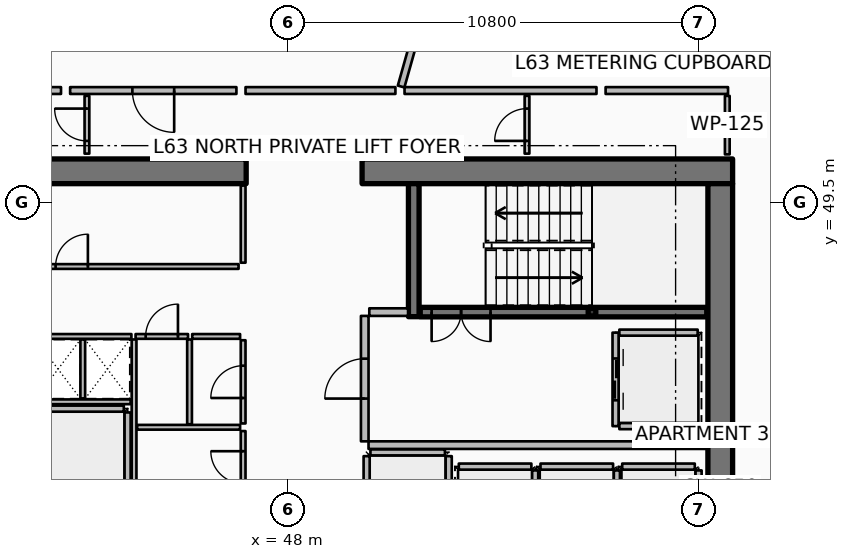
"""IFC4 building model, lengths in metres.
Left out: names, types, materials, properties, quantities, classifications, styles, units other than length and angle.
Written with IfcOpenShell. Run it as: python <this file> out.ifc"""

import sys

from ifc_helpers import new_model, si_unit, direction, frame, frame_2d, origin, origin_2d, place, context, subcontext, project, spatial, rectangle, hollow_rectangle, extrude, element, fill, save


model = new_model("IFC4")
c1 = context("Model", 3, precision=1e-05, world=origin(), true_north=direction((0.0, 1.0)))
c2 = subcontext(c1, "Body", "Model", "MODEL_VIEW")
j1 = project(units=[si_unit("LENGTHUNIT", "METRE"), si_unit("PLANEANGLEUNIT", "RADIAN")], contexts=[c1])
p1 = place(None, origin())
s1 = spatial("IfcSite", under=j1, at=p1, CompositionType="ELEMENT")
p2 = place(p1, origin())
s2 = spatial("IfcBuilding", under=s1, at=p2, CompositionType="ELEMENT")
p3 = place(p2, frame((0.0, 0.0, 252.1)))
s3 = spatial("IfcBuildingStorey", under=s2, at=p3, CompositionType="ELEMENT", Elevation=252.1)
for number, where, z_axis, x_axis in (
    (1, (37.15, 50.325, 0.0), (0.0, 0.0, 1.0), (1.0, 0.0, 0.0)),
    (2, (49.95, 50.325, 0.0), (0.0, 0.0, 1.0), (1.0, 0.0, 0.0)),
):
    element("IfcWall", number, at=place(p3, frame(where, z_axis=z_axis, x_axis=x_axis)), inside=s3, PredefinedType="SHEAR", context=c2, shape_type="SweptSolid", body=[
        extrude(rectangle(XDim=9.75, YDim=0.65, at=frame_2d((4.875, 0.0))), origin(), (0.0, 0.0, 1.0), 3.85),
    ])
p4 = place(p3, frame((59.375, 34.0, 0.0), z_axis=(0.0, 0.0, 1.0), x_axis=(0.0, 1.0, 0.0)))
e3 = element("IfcWall", 3, at=p4, inside=s3, PredefinedType="SHEAR", context=c2, shape_type="SweptSolid", body=[
    extrude(rectangle(XDim=16.0, YDim=0.65, at=frame_2d((8.0, 0.0))), origin(), (0.0, 0.0, 1.0), 3.85),
])
p5 = place(p3, frame((51.31, 46.5, 0.0), z_axis=(0.0, 0.0, 1.0), x_axis=(0.0, 1.0, 0.0)))
e4 = element("IfcWall", 4, at=p5, inside=s3, PredefinedType="SHEAR", context=c2, shape_type="SweptSolid", body=[
    extrude(rectangle(XDim=3.5, YDim=0.28, at=frame_2d((1.75, 0.0))), origin(), (0.0, 0.0, 1.0), 3.85),
])
p6 = place(p3, frame((56.0, 46.62, 0.0), z_axis=(0.0, 0.0, 1.0), x_axis=(1.0, 0.0, 0.0)))
e5 = element("IfcColumn", 5, at=p6, inside=s3, PredefinedType="COLUMN", context=c2, shape_type="SweptSolid", body=[
    extrude(hollow_rectangle(XDim=0.2, YDim=0.2, WallThickness=0.01, InnerFilletRadius=0.01, OuterFilletRadius=0.02, at=origin_2d()), origin(), (0.0, 0.0, 1.0), 1.72),
])
p7 = place(p3, frame((51.48, 46.62, 0.0), z_axis=(0.0, 0.0, 1.0), x_axis=(1.0, 0.0, 0.0)))
e6 = element("IfcWall", 6, at=p7, inside=s3, PredefinedType="SOLIDWALL", context=c2, shape_type="SweptSolid", body=[
    extrude(rectangle(XDim=7.54, YDim=0.25, at=frame_2d((3.77, 0.0))), origin(), (0.0, 0.0, 1.0), 3.59),
])
p8 = place(p7, frame((0.3, 0.0, 0.0)))
e7 = element("IfcOpeningElement", 7, at=p8, cuts=e6, PredefinedType="OPENING", context=c2, shape_type="SweptSolid", body=[
    extrude(rectangle(XDim=1.55, YDim=2.15, at=frame_2d((0.775, 1.075))), frame((0.0, 0.135, 0.0), z_axis=(0.0, -1.0, 0.0), x_axis=(1.0, 0.0, 0.0)), (0.0, 0.0, 1.0), 0.27),
])
p9 = place(p3, frame((54.505, 40.845, 0.0), z_axis=(0.0, 0.0, 1.0), x_axis=(0.0, 1.0, 0.0)))
e8 = element("IfcWall", 8, at=p9, inside=s3, PredefinedType="PARTITIONING", context=c2, shape_type="SweptSolid", body=[
    extrude(rectangle(XDim=1.61, YDim=0.16, at=frame_2d((0.805, 0.0))), origin(), (0.0, 0.0, 1.0), 3.59),
])
p10 = place(p3, frame((52.495, 42.555, 0.0), z_axis=(0.0, 0.0, 1.0), x_axis=(1.0, 0.0, 0.0)))
e9 = element("IfcWall", 9, at=p10, inside=s3, PredefinedType="PARTITIONING", context=c2, shape_type="SweptSolid", body=[
    extrude(rectangle(XDim=1.91, YDim=0.16, at=frame_2d((0.955, 0.0))), origin(), (0.0, 0.0, 1.0), 3.59),
])
p11 = place(p3, frame((56.655, 40.845, 0.0), z_axis=(0.0, 0.0, 1.0), x_axis=(0.0, 1.0, 0.0)))
e10 = element("IfcWall", 10, at=p11, inside=s3, PredefinedType="PARTITIONING", context=c2, shape_type="SweptSolid", body=[
    extrude(rectangle(XDim=1.61, YDim=0.16, at=frame_2d((0.805, 0.0))), origin(), (0.0, 0.0, 1.0), 3.59),
])
p12 = place(p3, frame((54.645, 42.555, 0.0), z_axis=(0.0, 0.0, 1.0), x_axis=(1.0, 0.0, 0.0)))
e11 = element("IfcWall", 11, at=p12, inside=s3, PredefinedType="PARTITIONING", context=c2, shape_type="SweptSolid", body=[
    extrude(rectangle(XDim=1.91, YDim=0.16, at=frame_2d((0.955, 0.0))), origin(), (0.0, 0.0, 1.0), 3.59),
])
p13 = place(p3, frame((58.805, 40.845, 0.0), z_axis=(0.0, 0.0, 1.0), x_axis=(0.0, 1.0, 0.0)))
e12 = element("IfcWall", 12, at=p13, inside=s3, PredefinedType="PARTITIONING", context=c2, shape_type="SweptSolid", body=[
    extrude(rectangle(XDim=1.61, YDim=0.16, at=frame_2d((0.805, 0.0))), origin(), (0.0, 0.0, 1.0), 3.59),
])
p14 = place(p3, frame((56.795, 42.555, 0.0), z_axis=(0.0, 0.0, 1.0), x_axis=(1.0, 0.0, 0.0)))
e13 = element("IfcWall", 13, at=p14, inside=s3, PredefinedType="PARTITIONING", context=c2, shape_type="SweptSolid", body=[
    extrude(rectangle(XDim=1.91, YDim=0.16, at=frame_2d((0.955, 0.0))), origin(), (0.0, 0.0, 1.0), 3.59),
])
p15 = place(p3, frame((43.78, 41.72, 0.0), z_axis=(0.0, 0.0, 1.0), x_axis=(0.0, 1.0, 0.0)))
e14 = element("IfcWall", 14, at=p15, inside=s3, PredefinedType="PARTITIONING", context=c2, shape_type="SweptSolid", body=[
    extrude(rectangle(XDim=2.26, YDim=0.16, at=frame_2d((1.13, 0.0))), origin(), (0.0, 0.0, 1.0), 3.59),
])
p16 = place(p3, frame((41.62, 44.08, 0.0), z_axis=(0.0, 0.0, 1.0), x_axis=(1.0, 0.0, 0.0)))
e15 = element("IfcWall", 15, at=p16, inside=s3, PredefinedType="PARTITIONING", context=c2, shape_type="SweptSolid", body=[
    extrude(rectangle(XDim=2.06, YDim=0.16, at=frame_2d((1.03, 0.0))), origin(), (0.0, 0.0, 1.0), 3.59),
])
p17 = place(p3, frame((56.62, 46.08, 0.0), z_axis=(0.0, 0.0, 1.0), x_axis=(0.0, -1.0, 0.0)))
e16 = element("IfcWall", 16, at=p17, inside=s3, PredefinedType="PARTITIONING", context=c2, shape_type="SweptSolid", body=[
    extrude(rectangle(XDim=2.46, YDim=0.16, at=frame_2d((1.23, 0.0))), origin(), (0.0, 0.0, 1.0), 3.59),
])
p18 = place(p17, frame((0.68, 0.0, 0.0)))
e17 = element("IfcOpeningElement", 17, at=p18, cuts=e16, PredefinedType="OPENING", context=c2, shape_type="SweptSolid", body=[
    extrude(rectangle(XDim=1.1, YDim=2.1, at=frame_2d((0.55, 1.05))), frame((0.0, 0.09, 0.0), z_axis=(0.0, -1.0, 0.0), x_axis=(1.0, 0.0, 0.0)), (0.0, 0.0, 1.0), 0.18),
])
for number, where, z_axis, x_axis in (
    (18, (56.72, 46.08, 0.0), (0.0, 0.0, 1.0), (1.0, 0.0, 0.0)),
    (19, (56.72, 43.62, 0.0), (0.0, 0.0, 1.0), (1.0, 0.0, 0.0)),
):
    element("IfcWall", number, at=place(p3, frame(where, z_axis=z_axis, x_axis=x_axis)), inside=s3, PredefinedType="PARTITIONING", context=c2, shape_type="SweptSolid", body=[
        extrude(rectangle(XDim=2.06, YDim=0.16, at=frame_2d((1.03, 0.0))), origin(), (0.0, 0.0, 1.0), 3.59),
    ])
for number, where, z_axis, x_axis in (
    (20, (52.23, 40.67, 0.0), (0.0, 0.0, 1.0), (0.0, 1.0, 0.0)),
    (21, (50.07, 40.67, 0.0), (0.0, 0.0, 1.0), (0.0, 1.0, 0.0)),
):
    element("IfcWall", number, at=place(p3, frame(where, z_axis=z_axis, x_axis=x_axis)), inside=s3, PredefinedType="PARTITIONING", context=c2, shape_type="SweptSolid", body=[
        extrude(rectangle(XDim=2.16, YDim=0.16, at=frame_2d((1.08, 0.0))), origin(), (0.0, 0.0, 1.0), 3.59),
    ])
p19 = place(p3, frame((50.17, 42.93, 0.0), z_axis=(0.0, 0.0, 1.0), x_axis=(1.0, 0.0, 0.0)))
e22 = element("IfcWall", 22, at=p19, inside=s3, PredefinedType="PARTITIONING", context=c2, shape_type="SweptSolid", body=[
    extrude(rectangle(XDim=1.96, YDim=0.16, at=frame_2d((0.98, 0.0))), origin(), (0.0, 0.0, 1.0), 3.59),
])
p20 = place(p3, frame((46.82, 47.92, 0.0), z_axis=(0.0, 0.0, 1.0), x_axis=(0.0, 1.0, 0.0)))
e23 = element("IfcWall", 23, at=p20, inside=s3, PredefinedType="PARTITIONING", context=c2, shape_type="SweptSolid", body=[
    extrude(rectangle(XDim=2.03, YDim=0.125, at=frame_2d((1.015, 0.0))), origin(), (0.0, 0.0, 1.0), 3.03),
])
p21 = place(p3, frame((37.92, 47.82, 0.0), z_axis=(0.0, 0.0, 1.0), x_axis=(1.0, 0.0, 0.0)))
e24 = element("IfcWall", 24, at=p21, inside=s3, PredefinedType="PARTITIONING", context=c2, shape_type="SweptSolid", body=[
    extrude(rectangle(XDim=8.78, YDim=0.125, at=frame_2d((4.39, 0.0))), origin(), (0.0, 0.0, 1.0), 3.03),
])
p22 = place(p21, frame((3.965, 0.0, 0.0)))
e25 = element("IfcOpeningElement", 25, at=p22, cuts=e24, PredefinedType="OPENING", context=c2, shape_type="SweptSolid", body=[
    extrude(rectangle(XDim=0.85, YDim=2.06, at=frame_2d((0.425, 1.03))), frame((0.0, 0.073, 0.0), z_axis=(0.0, -1.0, 0.0), x_axis=(1.0, 0.0, 0.0)), (0.0, 0.0, 1.0), 0.145),
])
p23 = place(p3, frame((50.12, 43.12, 0.0), z_axis=(0.0, 0.0, 1.0), x_axis=(1.0, 0.0, 0.0)))
e26 = element("IfcWall", 26, at=p23, inside=s3, PredefinedType="PARTITIONING", context=c2, shape_type="SweptSolid", body=[
    extrude(rectangle(XDim=8.88, YDim=0.2, at=frame_2d((4.44, 0.0))), origin(), (0.0, 0.0, 1.0), 3.59),
])
p24 = place(p3, frame((50.14, 46.62, 0.0), z_axis=(0.0, 0.0, 1.0), x_axis=(1.0, 0.0, 0.0)))
e27 = element("IfcWall", 27, at=p24, inside=s3, PredefinedType="PARTITIONING", context=c2, shape_type="SweptSolid", body=[
    extrude(rectangle(XDim=1.02, YDim=0.2, at=frame_2d((0.51, 0.0))), origin(), (0.0, 0.0, 1.0), 3.59),
])
p25 = place(p3, frame((50.02, 43.22, 0.0), z_axis=(0.0, 0.0, 1.0), x_axis=(0.0, 1.0, 0.0)))
e28 = element("IfcWall", 28, at=p25, inside=s3, PredefinedType="PARTITIONING", context=c2, shape_type="SweptSolid", body=[
    extrude(rectangle(XDim=3.3, YDim=0.2, at=frame_2d((1.65, 0.0))), origin(), (0.0, 0.0, 1.0), 3.59),
])
p26 = place(p25, frame((1.125, 0.0, 0.0)))
e29 = element("IfcOpeningElement", 29, at=p26, cuts=e28, PredefinedType="OPENING", context=c2, shape_type="SweptSolid", body=[
    extrude(rectangle(XDim=1.05, YDim=2.1, at=frame_2d((0.525, 1.05))), frame((0.0, 0.11, 0.0), z_axis=(0.0, -1.0, 0.0), x_axis=(1.0, 0.0, 0.0)), (0.0, 0.0, 1.0), 0.22),
])
p27 = place(p3, frame((41.36, 44.26, 0.0), z_axis=(0.0, 0.0, 1.0), x_axis=(1.0, 0.0, 0.0)))
e30 = element("IfcWall", 30, at=p27, inside=s3, PredefinedType="PARTITIONING", context=c2, shape_type="SweptSolid", body=[
    extrude(rectangle(XDim=2.5, YDim=0.125, at=frame_2d((1.25, 0.0))), origin(), (0.0, 0.0, 1.0), 3.03),
])
p28 = place(p3, frame((42.6, 44.35, 0.0), z_axis=(0.0, 0.0, 1.0), x_axis=(0.0, 1.0, 0.0)))
e31 = element("IfcWall", 31, at=p28, inside=s3, PredefinedType="PARTITIONING", context=c2, shape_type="SweptSolid", body=[
    extrude(rectangle(XDim=1.55, YDim=0.125, at=frame_2d((0.775, 0.0))), origin(), (0.0, 0.0, 1.0), 3.03),
])
p29 = place(p3, frame((43.95, 41.58, 0.0), z_axis=(0.0, 0.0, 1.0), x_axis=(0.0, 1.0, 0.0)))
e32 = element("IfcWall", 32, at=p29, inside=s3, PredefinedType="PARTITIONING", context=c2, shape_type="SweptSolid", body=[
    extrude(rectangle(XDim=4.32, YDim=0.125, at=frame_2d((2.16, 0.0))), origin(), (0.0, 0.0, 1.0), 3.03),
])
p30 = place(p3, frame((44.03, 43.59, 0.0), z_axis=(0.0, 0.0, 1.0), x_axis=(1.0, 0.0, 0.0)))
e33 = element("IfcWall", 33, at=p30, inside=s3, PredefinedType="PARTITIONING", context=c2, shape_type="SweptSolid", body=[
    extrude(rectangle(XDim=2.71, YDim=0.125, at=frame_2d((1.355, 0.0))), origin(), (0.0, 0.0, 1.0), 3.03),
])
p31 = place(p3, frame((45.41, 43.67, 0.0), z_axis=(0.0, 0.0, 1.0), x_axis=(0.0, 1.0, 0.0)))
e34 = element("IfcWall", 34, at=p31, inside=s3, PredefinedType="PARTITIONING", context=c2, shape_type="SweptSolid", body=[
    extrude(rectangle(XDim=2.23, YDim=0.125, at=frame_2d((1.115, 0.0))), origin(), (0.0, 0.0, 1.0), 3.03),
])
p32 = place(p3, frame((46.82, 41.58, 0.0), z_axis=(0.0, 0.0, 1.0), x_axis=(0.0, 1.0, 0.0)))
e35 = element("IfcWall", 35, at=p32, inside=s3, PredefinedType="PARTITIONING", context=c2, shape_type="SweptSolid", body=[
    extrude(rectangle(XDim=1.91, YDim=0.125, at=frame_2d((0.955, 0.0))), origin(), (0.0, 0.0, 1.0), 3.03),
])
p33 = place(p32, frame((0.53, 0.0, 0.0)))
e36 = element("IfcOpeningElement", 36, at=p33, cuts=e35, PredefinedType="OPENING", context=c2, shape_type="SweptSolid", body=[
    extrude(rectangle(XDim=0.85, YDim=2.06, at=frame_2d((0.425, 1.03))), frame((0.0, 0.073, 0.0), z_axis=(0.0, -1.0, 0.0), x_axis=(1.0, 0.0, 0.0)), (0.0, 0.0, 1.0), 0.145),
])
p34 = place(p3, frame((46.82, 43.69, 0.0), z_axis=(0.0, 0.0, 1.0), x_axis=(0.0, 1.0, 0.0)))
e37 = element("IfcWall", 37, at=p34, inside=s3, PredefinedType="PARTITIONING", context=c2, shape_type="SweptSolid", body=[
    extrude(rectangle(XDim=2.19, YDim=0.125, at=frame_2d((1.095, 0.0))), origin(), (0.0, 0.0, 1.0), 3.03),
])
p35 = place(p34, frame((0.67, 0.0, 0.0)))
e38 = element("IfcOpeningElement", 38, at=p35, cuts=e37, PredefinedType="OPENING", context=c2, shape_type="SweptSolid", body=[
    extrude(rectangle(XDim=0.85, YDim=2.06, at=frame_2d((0.425, 1.03))), frame((0.0, 0.073, 0.0), z_axis=(0.0, -1.0, 0.0), x_axis=(1.0, 0.0, 0.0)), (0.0, 0.0, 1.0), 0.145),
])
p36 = place(p3, frame((41.35, 45.98, 0.0), z_axis=(0.0, 0.0, 1.0), x_axis=(1.0, 0.0, 0.0)))
e39 = element("IfcWall", 39, at=p36, inside=s3, PredefinedType="PARTITIONING", context=c2, shape_type="SweptSolid", body=[
    extrude(rectangle(XDim=2.53, YDim=0.125, at=frame_2d((1.265, 0.0))), origin(), (0.0, 0.0, 1.0), 3.03),
])
p37 = place(p3, frame((43.99, 45.98, 0.0), z_axis=(0.0, 0.0, 1.0), x_axis=(1.0, 0.0, 0.0)))
e40 = element("IfcWall", 40, at=p37, inside=s3, PredefinedType="PARTITIONING", context=c2, shape_type="SweptSolid", body=[
    extrude(rectangle(XDim=1.38, YDim=0.125, at=frame_2d((0.69, 0.0))), origin(), (0.0, 0.0, 1.0), 3.03),
])
p38 = place(p37, frame((0.265, 0.0, 0.0)))
e41 = element("IfcOpeningElement", 41, at=p38, cuts=e40, PredefinedType="OPENING", context=c2, shape_type="SweptSolid", body=[
    extrude(rectangle(XDim=0.85, YDim=2.06, at=frame_2d((0.425, 1.03))), frame((0.0, 0.073, 0.0), z_axis=(0.0, -1.0, 0.0), x_axis=(1.0, 0.0, 0.0)), (0.0, 0.0, 1.0), 0.145),
])
p39 = place(p3, frame((45.48, 45.98, 0.0), z_axis=(0.0, 0.0, 1.0), x_axis=(1.0, 0.0, 0.0)))
e42 = element("IfcWall", 42, at=p39, inside=s3, PredefinedType="PARTITIONING", context=c2, shape_type="SweptSolid", body=[
    extrude(rectangle(XDim=1.26, YDim=0.125, at=frame_2d((0.63, 0.0))), origin(), (0.0, 0.0, 1.0), 3.03),
])
p40 = place(p3, frame((59.56, 50.77, 0.0), z_axis=(0.0, 0.0, 1.0), x_axis=(0.0, 1.0, 0.0)))
e43 = element("IfcWall", 43, at=p40, inside=s3, PredefinedType="PARTITIONING", context=c2, shape_type="SweptSolid", body=[
    extrude(rectangle(XDim=1.54, YDim=0.125, at=frame_2d((0.77, 0.0))), origin(), (0.0, 0.0, 1.0), 3.03),
])
p41 = place(p3, frame((42.71, 50.79, 0.0), z_axis=(0.0, 0.0, 1.0), x_axis=(0.0, 1.0, 0.0)))
e44 = element("IfcWall", 44, at=p41, inside=s3, PredefinedType="PARTITIONING", context=c2, shape_type="SweptSolid", body=[
    extrude(rectangle(XDim=1.52, YDim=0.125, at=frame_2d((0.76, 0.0))), origin(), (0.0, 0.0, 1.0), 2.957),
])
p42 = place(p41, frame((0.335, 0.0, 0.0)))
e45 = element("IfcOpeningElement", 45, at=p42, cuts=e44, PredefinedType="OPENING", context=c2, shape_type="SweptSolid", body=[
    extrude(rectangle(XDim=0.85, YDim=2.06, at=frame_2d((0.425, 1.03))), frame((0.0, 0.073, 0.0), z_axis=(0.0, -1.0, 0.0), x_axis=(1.0, 0.0, 0.0)), (0.0, 0.0, 1.0), 0.145),
])
p43 = place(p3, frame((54.29, 50.79, 0.0), z_axis=(0.0, 0.0, 1.0), x_axis=(0.0, 1.0, 0.0)))
e46 = element("IfcWall", 46, at=p43, inside=s3, PredefinedType="PARTITIONING", context=c2, shape_type="SweptSolid", body=[
    extrude(rectangle(XDim=1.52, YDim=0.125, at=frame_2d((0.76, 0.0))), origin(), (0.0, 0.0, 1.0), 3.03),
])
p44 = place(p43, frame((0.335, 0.0, 0.0)))
e47 = element("IfcOpeningElement", 47, at=p44, cuts=e46, PredefinedType="OPENING", context=c2, shape_type="SweptSolid", body=[
    extrude(rectangle(XDim=0.85, YDim=2.06, at=frame_2d((0.425, 1.03))), frame((0.0, 0.073, 0.0), z_axis=(0.0, -1.0, 0.0), x_axis=(1.0, 0.0, 0.0)), (0.0, 0.0, 1.0), 0.145),
])
p45 = place(p3, frame((50.977, 52.556, 0.0), z_axis=(0.0, 0.0, 1.0), x_axis=(0.271442063103, 0.962454781472, 0.0)))
e48 = element("IfcWall", 48, at=p45, inside=s3, PredefinedType="PARTITIONING", context=c2, shape_type="SweptSolid", body=[
    extrude(rectangle(XDim=16.017, YDim=0.18, at=frame_2d((8.008, 0.0))), origin(), (0.0, 0.0, 1.0), 2.957),
])
p46 = place(p3, frame((46.643, 52.45, 0.0), z_axis=(0.0, 0.0, 1.0), x_axis=(-1.0, 0.0, 0.0)))
e49 = element("IfcWall", 49, at=p46, inside=s3, PredefinedType="PARTITIONING", context=c2, shape_type="SweptSolid", body=[
    extrude(rectangle(XDim=4.376, YDim=0.18, at=frame_2d((2.188, 0.0))), origin(), (0.0, 0.0, 1.0), 2.957),
])
p47 = place(p46, frame((1.638, 0.0, 0.0)))
e50 = element("IfcOpeningElement", 50, at=p47, cuts=e49, PredefinedType="OPENING", context=c2, shape_type="SweptSolid", body=[
    extrude(rectangle(XDim=1.1, YDim=2.1, at=frame_2d((0.55, 1.05))), frame((0.0, 0.1, 0.0), z_axis=(0.0, -1.0, 0.0), x_axis=(1.0, 0.0, 0.0)), (0.0, 0.0, 1.0), 0.2),
])
p48 = place(p3, frame((50.827, 52.45, 0.0), z_axis=(0.0, 0.0, 1.0), x_axis=(-1.0, 0.0, 0.0)))
e51 = element("IfcWall", 51, at=p48, inside=s3, PredefinedType="PARTITIONING", context=c2, shape_type="SweptSolid", body=[
    extrude(rectangle(XDim=3.944, YDim=0.18, at=frame_2d((1.972, 0.0))), origin(), (0.0, 0.0, 1.0), 2.957),
])
p49 = place(p3, frame((42.028, 52.45, 0.0), z_axis=(0.0, 0.0, 1.0), x_axis=(-1.0, 0.0, 0.0)))
e52 = element("IfcWall", 52, at=p49, inside=s3, PredefinedType="PARTITIONING", context=c2, shape_type="SweptSolid", body=[
    extrude(rectangle(XDim=4.758, YDim=0.18, at=frame_2d((2.379, 0.0))), origin(), (0.0, 0.0, 1.0), 2.957),
])
p50 = place(p3, frame((59.58, 52.45, 0.0), z_axis=(0.0, 0.0, 1.0), x_axis=(-1.0, 0.0, 0.0)))
e53 = element("IfcWall", 53, at=p50, inside=s3, PredefinedType="PARTITIONING", context=c2, shape_type="SweptSolid", body=[
    extrude(rectangle(XDim=3.222, YDim=0.18, at=frame_2d((1.611, 0.0))), origin(), (0.0, 0.0, 1.0), 2.957),
])
p51 = place(p3, frame((56.118, 52.45, 0.0), z_axis=(0.0, 0.0, 1.0), x_axis=(-1.0, 0.0, 0.0)))
e54 = element("IfcWall", 54, at=p51, inside=s3, PredefinedType="PARTITIONING", context=c2, shape_type="SweptSolid", body=[
    extrude(rectangle(XDim=5.051, YDim=0.18, at=frame_2d((2.525, 0.0))), origin(), (0.0, 0.0, 1.0), 2.957),
])
p52 = place(p8, origin())
e55 = element("IfcDoor", 55, at=p52, inside=s3, OperationType="DOUBLE_DOOR_SINGLE_SWING", PredefinedType="DOOR", context=c2, shape_type="SweptSolid", body=[
    extrude(rectangle(XDim=1.55, YDim=2.15, at=frame_2d((0.775, 1.075))), frame((0.0, 0.025, 0.0), z_axis=(0.0, -1.0, 0.0), x_axis=(1.0, 0.0, 0.0)), (0.0, 0.0, 1.0), 0.05),
])
fill(e7, e55)
p53 = place(p18, origin())
e56 = element("IfcDoor", 56, at=p53, inside=s3, OperationType="DOUBLE_DOOR_SLIDING", PredefinedType="DOOR", context=c2, shape_type="SweptSolid", body=[
    extrude(rectangle(XDim=1.1, YDim=2.1, at=frame_2d((0.55, 1.05))), frame((0.0, 0.025, 0.0), z_axis=(0.0, -1.0, 0.0), x_axis=(1.0, 0.0, 0.0)), (0.0, 0.0, 1.0), 0.05),
])
fill(e17, e56)
p54 = place(p22, origin())
e57 = element("IfcDoor", 57, at=p54, inside=s3, OperationType="SINGLE_SWING_RIGHT", PredefinedType="DOOR", context=c2, shape_type="SweptSolid", body=[
    extrude(rectangle(XDim=0.85, YDim=2.06, at=frame_2d((0.425, 1.03))), frame((0.0, 0.025, 0.0), z_axis=(0.0, -1.0, 0.0), x_axis=(1.0, 0.0, 0.0)), (0.0, 0.0, 1.0), 0.05),
])
fill(e25, e57)
p55 = place(p26, origin())
e58 = element("IfcDoor", 58, at=p55, inside=s3, OperationType="SINGLE_SWING_LEFT", PredefinedType="DOOR", context=c2, shape_type="SweptSolid", body=[
    extrude(rectangle(XDim=1.05, YDim=2.1, at=frame_2d((0.525, 1.05))), frame((0.0, 0.025, 0.0), z_axis=(0.0, -1.0, 0.0), x_axis=(1.0, 0.0, 0.0)), (0.0, 0.0, 1.0), 0.05),
])
fill(e29, e58)
p56 = place(p33, origin())
e59 = element("IfcDoor", 59, at=p56, inside=s3, OperationType="SINGLE_SWING_RIGHT", PredefinedType="DOOR", context=c2, shape_type="SweptSolid", body=[
    extrude(rectangle(XDim=0.85, YDim=2.06, at=frame_2d((0.425, 1.03))), frame((0.0, 0.025, 0.0), z_axis=(0.0, -1.0, 0.0), x_axis=(1.0, 0.0, 0.0)), (0.0, 0.0, 1.0), 0.05),
])
fill(e36, e59)
p57 = place(p35, origin())
e60 = element("IfcDoor", 60, at=p57, inside=s3, OperationType="SINGLE_SWING_LEFT", PredefinedType="DOOR", context=c2, shape_type="SweptSolid", body=[
    extrude(rectangle(XDim=0.85, YDim=2.06, at=frame_2d((0.425, 1.03))), frame((0.0, 0.025, 0.0), z_axis=(0.0, -1.0, 0.0), x_axis=(1.0, 0.0, 0.0)), (0.0, 0.0, 1.0), 0.05),
])
fill(e38, e60)
p58 = place(p38, origin())
e61 = element("IfcDoor", 61, at=p58, inside=s3, OperationType="SINGLE_SWING_RIGHT", PredefinedType="DOOR", context=c2, shape_type="SweptSolid", body=[
    extrude(rectangle(XDim=0.85, YDim=2.06, at=frame_2d((0.425, 1.03))), frame((0.0, 0.025, 0.0), z_axis=(0.0, -1.0, 0.0), x_axis=(1.0, 0.0, 0.0)), (0.0, 0.0, 1.0), 0.05),
])
fill(e41, e61)
p59 = place(p42, origin())
e62 = element("IfcDoor", 62, at=p59, inside=s3, OperationType="SINGLE_SWING_RIGHT", PredefinedType="DOOR", context=c2, shape_type="SweptSolid", body=[
    extrude(rectangle(XDim=0.85, YDim=2.06, at=frame_2d((0.425, 1.03))), frame((0.0, 0.025, 0.0), z_axis=(0.0, -1.0, 0.0), x_axis=(1.0, 0.0, 0.0)), (0.0, 0.0, 1.0), 0.05),
])
fill(e45, e62)
p60 = place(p44, origin())
e63 = element("IfcDoor", 63, at=p60, inside=s3, OperationType="SINGLE_SWING_LEFT", PredefinedType="DOOR", context=c2, shape_type="SweptSolid", body=[
    extrude(rectangle(XDim=0.85, YDim=2.06, at=frame_2d((0.425, 1.03))), frame((0.0, 0.025, 0.0), z_axis=(0.0, -1.0, 0.0), x_axis=(1.0, 0.0, 0.0)), (0.0, 0.0, 1.0), 0.05),
])
fill(e47, e63)
p61 = place(p47, origin())
e64 = element("IfcDoor", 64, at=p61, inside=s3, OperationType="SINGLE_SWING_LEFT", PredefinedType="DOOR", context=c2, shape_type="SweptSolid", body=[
    extrude(rectangle(XDim=1.1, YDim=2.1, at=frame_2d((0.55, 1.05))), frame((0.0, 0.025, 0.0), z_axis=(0.0, -1.0, 0.0), x_axis=(1.0, 0.0, 0.0)), (0.0, 0.0, 1.0), 0.05),
])
fill(e50, e64)
save(model, sys.argv[1])
